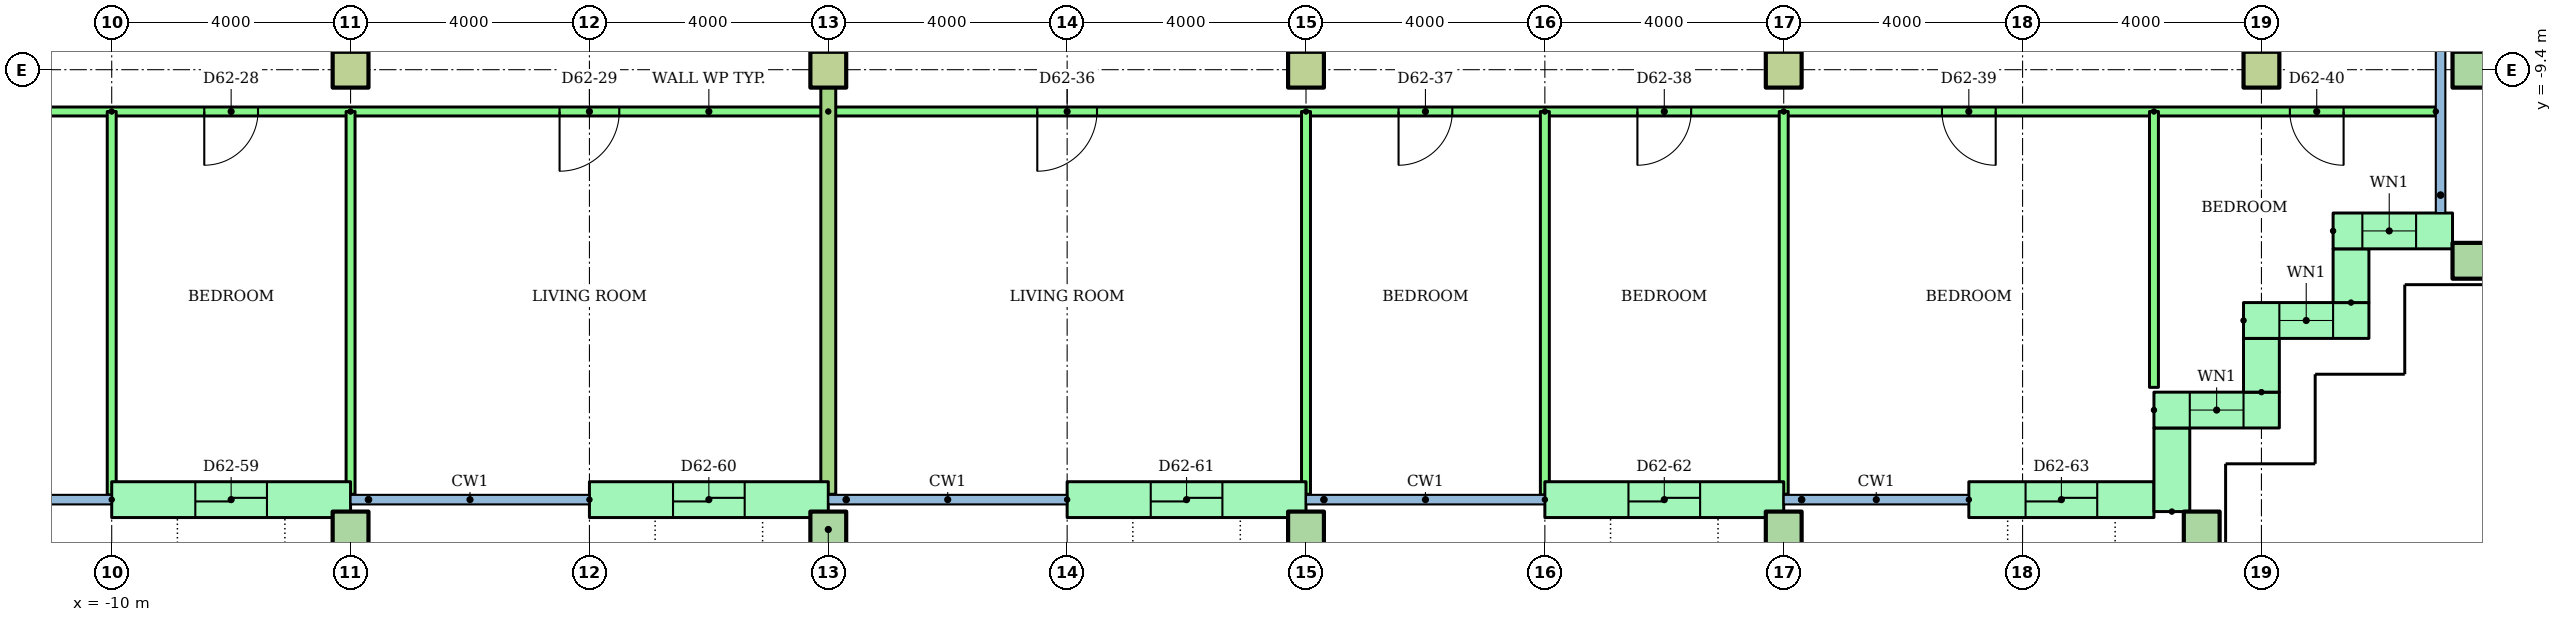
"""IFC4 building model, lengths in metres.
Left out: names, types, materials, properties, quantities, classifications, styles, units other than length and angle.
Written with IfcOpenShell. Run it as: python <this file> out.ifc"""

import sys

from ifc_helpers import new_model, si_unit, direction, frame, frame_2d, origin, origin_2d, place, context, subcontext, project, spatial, rectangle, hollow_rectangle, extrude, element, fill, save


model = new_model("IFC4")
c1 = context("Model", 3, precision=1e-05, world=origin(), true_north=direction((0.0, 1.0)))
c2 = subcontext(c1, "Body", "Model", "MODEL_VIEW")
j1 = project(units=[si_unit("LENGTHUNIT", "METRE"), si_unit("PLANEANGLEUNIT", "RADIAN")], contexts=[c1])
p1 = place(None, origin())
s1 = spatial("IfcSite", under=j1, at=p1, CompositionType="ELEMENT")
p2 = place(p1, origin())
s2 = spatial("IfcBuilding", under=s1, at=p2, CompositionType="ELEMENT")
p3 = place(p2, frame((0.0, 0.0, 236.4)))
s3 = spatial("IfcBuildingStorey", under=s2, at=p3, CompositionType="ELEMENT", Elevation=236.4)
for number, where in (
    (1, (-6.0, -17.1, 0.0)),
    (2, (2.0, -17.1, 0.0)),
    (3, (10.0, -17.1, 0.0)),
    (4, (18.0, -17.1, 0.0)),
    (5, (25.0, -17.1, 0.0)),
    (6, (29.5, -12.6, 0.0)),
):
    element("IfcColumn", number, at=place(p3, frame(where)), inside=s3, PredefinedType="COLUMN", context=c2, shape_type="SweptSolid", body=[
        extrude(hollow_rectangle(XDim=0.6, YDim=0.6, WallThickness=0.03, at=origin_2d()), origin(), (0.0, 0.0, 1.0), 3.2),
    ])
for number, where in (
    (7, (-6.0, -9.4, 0.0)),
    (8, (2.0, -9.4, 0.0)),
    (9, (10.0, -9.4, 0.0)),
    (10, (18.0, -9.4, 0.0)),
    (11, (26.0, -9.4, 0.0)),
):
    element("IfcColumn", number, at=place(p3, frame(where)), inside=s3, PredefinedType="COLUMN", context=c2, shape_type="SweptSolid", body=[
        extrude(rectangle(XDim=0.6, YDim=0.6, at=origin_2d()), origin(), (0.0, 0.0, 1.0), 3.2),
    ])
p4 = place(p3, frame((29.5, -9.4, 0.0)))
e12 = element("IfcColumn", 12, at=p4, inside=s3, PredefinedType="COLUMN", context=c2, shape_type="SweptSolid", body=[
    extrude(hollow_rectangle(XDim=0.6, YDim=0.6, WallThickness=0.03, at=origin_2d()), origin(), (0.0, 0.0, 1.0), 3.2),
])
p5 = place(p3, frame((-10.0, -16.6, 0.0)))
e13 = element("IfcWall", 13, at=p5, inside=s3, PredefinedType="STANDARD", context=c2, shape_type="SweptSolid", body=[
    extrude(rectangle(XDim=4.0, YDim=0.6, at=frame_2d((2.0, 0.0))), origin(), (0.0, 0.0, 1.0), 2.8),
])
p6 = place(p5, frame((1.4, 0.0, 0.0)))
e14 = element("IfcOpeningElement", 14, at=p6, cuts=e13, PredefinedType="OPENING", context=c2, shape_type="SweptSolid", body=[
    extrude(rectangle(XDim=1.2, YDim=2.1, at=frame_2d((0.6, 1.05))), frame((0.0, 0.31, 0.0), z_axis=(0.0, -1.0, 0.0), x_axis=(1.0, 0.0, 0.0)), (0.0, 0.0, 1.0), 0.62),
])
p7 = place(p3, frame((-2.0, -16.6, 0.0)))
e15 = element("IfcWall", 15, at=p7, inside=s3, PredefinedType="STANDARD", context=c2, shape_type="SweptSolid", body=[
    extrude(rectangle(XDim=4.0, YDim=0.6, at=frame_2d((2.0, 0.0))), origin(), (0.0, 0.0, 1.0), 2.8),
])
p8 = place(p7, frame((1.4, 0.0, 0.0)))
e16 = element("IfcOpeningElement", 16, at=p8, cuts=e15, PredefinedType="OPENING", context=c2, shape_type="SweptSolid", body=[
    extrude(rectangle(XDim=1.2, YDim=2.1, at=frame_2d((0.6, 1.05))), frame((0.0, 0.31, 0.0), z_axis=(0.0, -1.0, 0.0), x_axis=(1.0, 0.0, 0.0)), (0.0, 0.0, 1.0), 0.62),
])
p9 = place(p3, frame((6.0, -16.6, 0.0)))
e17 = element("IfcWall", 17, at=p9, inside=s3, PredefinedType="STANDARD", context=c2, shape_type="SweptSolid", body=[
    extrude(rectangle(XDim=4.0, YDim=0.6, at=frame_2d((2.0, 0.0))), origin(), (0.0, 0.0, 1.0), 2.8),
])
p10 = place(p9, frame((1.4, 0.0, 0.0)))
e18 = element("IfcOpeningElement", 18, at=p10, cuts=e17, PredefinedType="OPENING", context=c2, shape_type="SweptSolid", body=[
    extrude(rectangle(XDim=1.2, YDim=2.1, at=frame_2d((0.6, 1.05))), frame((0.0, 0.31, 0.0), z_axis=(0.0, -1.0, 0.0), x_axis=(1.0, 0.0, 0.0)), (0.0, 0.0, 1.0), 0.62),
])
p11 = place(p3, frame((14.0, -16.6, 0.0)))
e19 = element("IfcWall", 19, at=p11, inside=s3, PredefinedType="STANDARD", context=c2, shape_type="SweptSolid", body=[
    extrude(rectangle(XDim=4.0, YDim=0.6, at=frame_2d((2.0, 0.0))), origin(), (0.0, 0.0, 1.0), 2.8),
])
p12 = place(p11, frame((1.4, 0.0, 0.0)))
e20 = element("IfcOpeningElement", 20, at=p12, cuts=e19, PredefinedType="OPENING", context=c2, shape_type="SweptSolid", body=[
    extrude(rectangle(XDim=1.2, YDim=2.1, at=frame_2d((0.6, 1.05))), frame((0.0, 0.31, 0.0), z_axis=(0.0, -1.0, 0.0), x_axis=(1.0, 0.0, 0.0)), (0.0, 0.0, 1.0), 0.62),
])
p13 = place(p3, frame((21.1, -16.6, 0.0)))
e21 = element("IfcWall", 21, at=p13, inside=s3, PredefinedType="STANDARD", context=c2, shape_type="SweptSolid", body=[
    extrude(rectangle(XDim=3.1, YDim=0.6, at=frame_2d((1.55, 0.0))), origin(), (0.0, 0.0, 1.0), 2.8),
])
p14 = place(p13, frame((0.95, 0.0, 0.0)))
e22 = element("IfcOpeningElement", 22, at=p14, cuts=e21, PredefinedType="OPENING", context=c2, shape_type="SweptSolid", body=[
    extrude(rectangle(XDim=1.2, YDim=2.1, at=frame_2d((0.6, 1.05))), frame((0.0, 0.31, 0.0), z_axis=(0.0, -1.0, 0.0), x_axis=(1.0, 0.0, 0.0)), (0.0, 0.0, 1.0), 0.62),
])
p15 = place(p3, frame((24.5, -16.8, 0.0), z_axis=(0.0, 0.0, 1.0), x_axis=(0.0, 1.0, 0.0)))
e23 = element("IfcWall", 23, at=p15, inside=s3, PredefinedType="STANDARD", context=c2, shape_type="SweptSolid", body=[
    extrude(rectangle(XDim=1.4, YDim=0.6, at=frame_2d((0.7, 0.0))), origin(), (0.0, 0.0, 1.0), 2.8),
])
p16 = place(p3, frame((24.2, -15.1, 0.0)))
e24 = element("IfcWall", 24, at=p16, inside=s3, PredefinedType="STANDARD", context=c2, shape_type="SweptSolid", body=[
    extrude(rectangle(XDim=2.1, YDim=0.6, at=frame_2d((1.05, 0.0))), origin(), (0.0, 0.0, 1.0), 2.8),
])
p17 = place(p16, frame((0.6, 0.0, 0.9)))
e25 = element("IfcOpeningElement", 25, at=p17, cuts=e24, PredefinedType="OPENING", context=c2, shape_type="SweptSolid", body=[
    extrude(rectangle(XDim=0.9, YDim=1.5, at=frame_2d((0.45, 0.75))), frame((0.0, 0.31, 0.0), z_axis=(0.0, -1.0, 0.0), x_axis=(1.0, 0.0, 0.0)), (0.0, 0.0, 1.0), 0.62),
])
p18 = place(p3, frame((26.0, -14.8, 0.0), z_axis=(0.0, 0.0, 1.0), x_axis=(0.0, 1.0, 0.0)))
e26 = element("IfcWall", 26, at=p18, inside=s3, PredefinedType="STANDARD", context=c2, shape_type="SweptSolid", body=[
    extrude(rectangle(XDim=0.9, YDim=0.6, at=frame_2d((0.45, 0.0))), origin(), (0.0, 0.0, 1.0), 2.8),
])
p19 = place(p3, frame((25.7, -13.6, 0.0)))
e27 = element("IfcWall", 27, at=p19, inside=s3, PredefinedType="STANDARD", context=c2, shape_type="SweptSolid", body=[
    extrude(rectangle(XDim=2.1, YDim=0.6, at=frame_2d((1.05, 0.0))), origin(), (0.0, 0.0, 1.0), 2.8),
])
p20 = place(p19, frame((0.6, 0.0, 0.9)))
e28 = element("IfcOpeningElement", 28, at=p20, cuts=e27, PredefinedType="OPENING", context=c2, shape_type="SweptSolid", body=[
    extrude(rectangle(XDim=0.9, YDim=1.5, at=frame_2d((0.45, 0.75))), frame((0.0, 0.31, 0.0), z_axis=(0.0, -1.0, 0.0), x_axis=(1.0, 0.0, 0.0)), (0.0, 0.0, 1.0), 0.62),
])
p21 = place(p3, frame((27.5, -13.3, 0.0), z_axis=(0.0, 0.0, 1.0), x_axis=(0.0, 1.0, 0.0)))
e29 = element("IfcWall", 29, at=p21, inside=s3, PredefinedType="STANDARD", context=c2, shape_type="SweptSolid", body=[
    extrude(rectangle(XDim=0.9, YDim=0.6, at=frame_2d((0.45, 0.0))), origin(), (0.0, 0.0, 1.0), 2.8),
])
p22 = place(p3, frame((27.2, -12.1, 0.0)))
e30 = element("IfcWall", 30, at=p22, inside=s3, PredefinedType="STANDARD", context=c2, shape_type="SweptSolid", body=[
    extrude(rectangle(XDim=2.0, YDim=0.6, at=frame_2d((1.0, 0.0))), origin(), (0.0, 0.0, 1.0), 2.8),
])
p23 = place(p22, frame((0.49, 0.0, 0.9)))
e31 = element("IfcOpeningElement", 31, at=p23, cuts=e30, PredefinedType="OPENING", context=c2, shape_type="SweptSolid", body=[
    extrude(rectangle(XDim=0.9, YDim=1.5, at=frame_2d((0.45, 0.75))), frame((0.0, 0.31, 0.0), z_axis=(0.0, -1.0, 0.0), x_axis=(1.0, 0.0, 0.0)), (0.0, 0.0, 1.0), 0.62),
])
p24 = place(p3, frame((2.0, -10.1, 0.0), z_axis=(0.0, 0.0, 1.0), x_axis=(-1.0, 0.0, 0.0)))
e32 = element("IfcWall", 32, at=p24, inside=s3, PredefinedType="PARTITIONING", context=c2, shape_type="SweptSolid", body=[
    extrude(rectangle(XDim=16.0, YDim=0.15, at=frame_2d((8.0, 0.0))), origin(), (0.0, 0.0, 1.0), 2.4),
])
p25 = place(p24, frame((13.55, 0.0, 0.0)))
e33 = element("IfcOpeningElement", 33, at=p25, cuts=e32, PredefinedType="OPENING", context=c2, shape_type="SweptSolid", body=[
    extrude(rectangle(XDim=0.9, YDim=2.1, at=frame_2d((0.45, 1.05))), frame((0.0, 0.085, 0.0), z_axis=(0.0, -1.0, 0.0), x_axis=(1.0, 0.0, 0.0)), (0.0, 0.0, 1.0), 0.17),
])
p26 = place(p24, frame((9.55, 0.0, 0.0)))
e34 = element("IfcOpeningElement", 34, at=p26, cuts=e32, PredefinedType="OPENING", context=c2, shape_type="SweptSolid", body=[
    extrude(rectangle(XDim=0.9, YDim=2.1, at=frame_2d((0.45, 1.05))), frame((0.0, 0.085, 0.0), z_axis=(0.0, -1.0, 0.0), x_axis=(1.0, 0.0, 0.0)), (0.0, 0.0, 1.0), 0.17),
])
p27 = place(p24, frame((3.5, 0.0, 0.0)))
e35 = element("IfcOpeningElement", 35, at=p27, cuts=e32, PredefinedType="OPENING", context=c2, shape_type="SweptSolid", body=[
    extrude(rectangle(XDim=1.0, YDim=2.1, at=frame_2d((0.5, 1.05))), frame((0.0, 0.085, 0.0), z_axis=(0.0, -1.0, 0.0), x_axis=(1.0, 0.0, 0.0)), (0.0, 0.0, 1.0), 0.17),
])
p28 = place(p3, frame((-10.0, -10.1, 0.0), z_axis=(0.0, 0.0, 1.0), x_axis=(0.0, -1.0, 0.0)))
e36 = element("IfcWall", 36, at=p28, inside=s3, PredefinedType="PARTITIONING", context=c2, shape_type="SweptSolid", body=[
    extrude(rectangle(XDim=6.421, YDim=0.15, at=frame_2d((3.21, 0.0))), origin(), (0.0, 0.0, 1.0), 2.4),
])
p29 = place(p3, frame((-6.0, -10.1, 0.0), z_axis=(0.0, 0.0, 1.0), x_axis=(0.0, -1.0, 0.0)))
e37 = element("IfcWall", 37, at=p29, inside=s3, PredefinedType="PARTITIONING", context=c2, shape_type="SweptSolid", body=[
    extrude(rectangle(XDim=6.41, YDim=0.15, at=frame_2d((3.205, 0.0))), origin(), (0.0, 0.0, 1.0), 2.4),
])
p30 = place(p3, frame((28.92, -10.1, 0.0), z_axis=(0.0, 0.0, 1.0), x_axis=(-1.0, 0.0, 0.0)))
e38 = element("IfcWall", 38, at=p30, inside=s3, PredefinedType="PARTITIONING", context=c2, shape_type="SweptSolid", body=[
    extrude(rectangle(XDim=26.92, YDim=0.15, at=frame_2d((13.46, 0.0))), origin(), (0.0, 0.0, 1.0), 2.4),
])
p31 = place(p30, frame((22.42, 0.0, 0.0)))
e39 = element("IfcOpeningElement", 39, at=p31, cuts=e38, PredefinedType="OPENING", context=c2, shape_type="SweptSolid", body=[
    extrude(rectangle(XDim=1.0, YDim=2.1, at=frame_2d((0.5, 1.05))), frame((0.0, 0.085, 0.0), z_axis=(0.0, -1.0, 0.0), x_axis=(1.0, 0.0, 0.0)), (0.0, 0.0, 1.0), 0.17),
])
p32 = place(p30, frame((16.47, 0.0, 0.0)))
e40 = element("IfcOpeningElement", 40, at=p32, cuts=e38, PredefinedType="OPENING", context=c2, shape_type="SweptSolid", body=[
    extrude(rectangle(XDim=0.9, YDim=2.1, at=frame_2d((0.45, 1.05))), frame((0.0, 0.085, 0.0), z_axis=(0.0, -1.0, 0.0), x_axis=(1.0, 0.0, 0.0)), (0.0, 0.0, 1.0), 0.17),
])
p33 = place(p30, frame((12.47, 0.0, 0.0)))
e41 = element("IfcOpeningElement", 41, at=p33, cuts=e38, PredefinedType="OPENING", context=c2, shape_type="SweptSolid", body=[
    extrude(rectangle(XDim=0.9, YDim=2.1, at=frame_2d((0.45, 1.05))), frame((0.0, 0.085, 0.0), z_axis=(0.0, -1.0, 0.0), x_axis=(1.0, 0.0, 0.0)), (0.0, 0.0, 1.0), 0.17),
])
p34 = place(p30, frame((7.37, 0.0, 0.0)))
e42 = element("IfcOpeningElement", 42, at=p34, cuts=e38, PredefinedType="OPENING", context=c2, shape_type="SweptSolid", body=[
    extrude(rectangle(XDim=0.9, YDim=2.1, at=frame_2d((0.45, 1.05))), frame((0.0, 0.085, 0.0), z_axis=(0.0, -1.0, 0.0), x_axis=(1.0, 0.0, 0.0)), (0.0, 0.0, 1.0), 0.17),
])
p35 = place(p30, frame((1.544, 0.0, 0.0)))
e43 = element("IfcOpeningElement", 43, at=p35, cuts=e38, PredefinedType="OPENING", context=c2, shape_type="SweptSolid", body=[
    extrude(rectangle(XDim=0.9, YDim=2.1, at=frame_2d((0.45, 1.05))), frame((0.0, 0.085, 0.0), z_axis=(0.0, -1.0, 0.0), x_axis=(1.0, 0.0, 0.0)), (0.0, 0.0, 1.0), 0.17),
])
p36 = place(p3, frame((10.0, -10.1, 0.0), z_axis=(0.0, 0.0, 1.0), x_axis=(0.0, -1.0, 0.0)))
e44 = element("IfcWall", 44, at=p36, inside=s3, PredefinedType="PARTITIONING", context=c2, shape_type="SweptSolid", body=[
    extrude(rectangle(XDim=6.41, YDim=0.15, at=frame_2d((3.205, 0.0))), origin(), (0.0, 0.0, 1.0), 2.4),
])
p37 = place(p3, frame((14.0, -10.1, 0.0), z_axis=(0.0, 0.0, 1.0), x_axis=(0.0, -1.0, 0.0)))
e45 = element("IfcWall", 45, at=p37, inside=s3, PredefinedType="PARTITIONING", context=c2, shape_type="SweptSolid", body=[
    extrude(rectangle(XDim=6.421, YDim=0.15, at=frame_2d((3.21, 0.0))), origin(), (0.0, 0.0, 1.0), 2.4),
])
p38 = place(p3, frame((18.0, -10.1, 0.0), z_axis=(0.0, 0.0, 1.0), x_axis=(0.0, -1.0, 0.0)))
e46 = element("IfcWall", 46, at=p38, inside=s3, PredefinedType="PARTITIONING", context=c2, shape_type="SweptSolid", body=[
    extrude(rectangle(XDim=6.41, YDim=0.15, at=frame_2d((3.205, 0.0))), origin(), (0.0, 0.0, 1.0), 2.4),
])
p39 = place(p3, frame((24.2, -10.1, 0.0), z_axis=(0.0, 0.0, 1.0), x_axis=(0.0, -1.0, 0.0)))
e47 = element("IfcWall", 47, at=p39, inside=s3, PredefinedType="PARTITIONING", context=c2, shape_type="SweptSolid", body=[
    extrude(rectangle(XDim=4.62, YDim=0.15, at=frame_2d((2.31, 0.0))), origin(), (0.0, 0.0, 1.0), 2.4),
])
p40 = place(p3, frame((2.0, -1.4, 0.0), z_axis=(0.0, 0.0, 1.0), x_axis=(0.0, -1.0, 0.0)))
e48 = element("IfcWall", 48, at=p40, inside=s3, PredefinedType="PARTITIONING", context=c2, shape_type="SweptSolid", body=[
    extrude(rectangle(XDim=15.11, YDim=0.25, at=frame_2d((7.555, 0.0))), origin(), (0.0, 0.0, 1.0), 2.4),
])
p41 = place(p17, origin())
e49 = element("IfcWindow", 49, at=p41, inside=s3, PartitioningType="SINGLE_PANEL", PredefinedType="WINDOW", context=c2, shape_type="SweptSolid", body=[
    extrude(rectangle(XDim=0.9, YDim=1.5, at=frame_2d((0.45, 0.75))), frame((0.0, 0.03, 0.0), z_axis=(0.0, -1.0, 0.0), x_axis=(1.0, 0.0, 0.0)), (0.0, 0.0, 1.0), 0.06),
])
fill(e25, e49)
p42 = place(p20, origin())
e50 = element("IfcWindow", 50, at=p42, inside=s3, PartitioningType="SINGLE_PANEL", PredefinedType="WINDOW", context=c2, shape_type="SweptSolid", body=[
    extrude(rectangle(XDim=0.9, YDim=1.5, at=frame_2d((0.45, 0.75))), frame((0.0, 0.03, 0.0), z_axis=(0.0, -1.0, 0.0), x_axis=(1.0, 0.0, 0.0)), (0.0, 0.0, 1.0), 0.06),
])
fill(e28, e50)
p43 = place(p23, origin())
e51 = element("IfcWindow", 51, at=p43, inside=s3, PartitioningType="SINGLE_PANEL", PredefinedType="WINDOW", context=c2, shape_type="SweptSolid", body=[
    extrude(rectangle(XDim=0.9, YDim=1.5, at=frame_2d((0.45, 0.75))), frame((0.0, 0.03, 0.0), z_axis=(0.0, -1.0, 0.0), x_axis=(1.0, 0.0, 0.0)), (0.0, 0.0, 1.0), 0.06),
])
fill(e31, e51)
p44 = place(p26, origin())
e52 = element("IfcDoor", 52, at=p44, inside=s3, OperationType="SINGLE_SWING_RIGHT", PredefinedType="DOOR", context=c2, shape_type="SweptSolid", body=[
    extrude(rectangle(XDim=0.9, YDim=2.1, at=frame_2d((0.45, 1.05))), frame((0.0, 0.025, 0.0), z_axis=(0.0, -1.0, 0.0), x_axis=(1.0, 0.0, 0.0)), (0.0, 0.0, 1.0), 0.05),
])
fill(e34, e52)
p45 = place(p27, origin())
e53 = element("IfcDoor", 53, at=p45, inside=s3, OperationType="SINGLE_SWING_RIGHT", PredefinedType="DOOR", context=c2, shape_type="SweptSolid", body=[
    extrude(rectangle(XDim=1.0, YDim=2.1, at=frame_2d((0.5, 1.05))), frame((0.0, 0.025, 0.0), z_axis=(0.0, -1.0, 0.0), x_axis=(1.0, 0.0, 0.0)), (0.0, 0.0, 1.0), 0.05),
])
fill(e35, e53)
p46 = place(p31, origin())
e54 = element("IfcDoor", 54, at=p46, inside=s3, OperationType="SINGLE_SWING_RIGHT", PredefinedType="DOOR", context=c2, shape_type="SweptSolid", body=[
    extrude(rectangle(XDim=1.0, YDim=2.1, at=frame_2d((0.5, 1.05))), frame((0.0, 0.025, 0.0), z_axis=(0.0, -1.0, 0.0), x_axis=(1.0, 0.0, 0.0)), (0.0, 0.0, 1.0), 0.05),
])
fill(e39, e54)
p47 = place(p32, origin())
e55 = element("IfcDoor", 55, at=p47, inside=s3, OperationType="SINGLE_SWING_RIGHT", PredefinedType="DOOR", context=c2, shape_type="SweptSolid", body=[
    extrude(rectangle(XDim=0.9, YDim=2.1, at=frame_2d((0.45, 1.05))), frame((0.0, 0.025, 0.0), z_axis=(0.0, -1.0, 0.0), x_axis=(1.0, 0.0, 0.0)), (0.0, 0.0, 1.0), 0.05),
])
fill(e40, e55)
p48 = place(p33, origin())
e56 = element("IfcDoor", 56, at=p48, inside=s3, OperationType="SINGLE_SWING_RIGHT", PredefinedType="DOOR", context=c2, shape_type="SweptSolid", body=[
    extrude(rectangle(XDim=0.9, YDim=2.1, at=frame_2d((0.45, 1.05))), frame((0.0, 0.025, 0.0), z_axis=(0.0, -1.0, 0.0), x_axis=(1.0, 0.0, 0.0)), (0.0, 0.0, 1.0), 0.05),
])
fill(e41, e56)
p49 = place(p34, origin())
e57 = element("IfcDoor", 57, at=p49, inside=s3, OperationType="SINGLE_SWING_LEFT", PredefinedType="DOOR", context=c2, shape_type="SweptSolid", body=[
    extrude(rectangle(XDim=0.9, YDim=2.1, at=frame_2d((0.45, 1.05))), frame((0.0, 0.025, 0.0), z_axis=(0.0, -1.0, 0.0), x_axis=(1.0, 0.0, 0.0)), (0.0, 0.0, 1.0), 0.05),
])
fill(e42, e57)
p50 = place(p35, origin())
e58 = element("IfcDoor", 58, at=p50, inside=s3, OperationType="SINGLE_SWING_LEFT", PredefinedType="DOOR", context=c2, shape_type="SweptSolid", body=[
    extrude(rectangle(XDim=0.9, YDim=2.1, at=frame_2d((0.45, 1.05))), frame((0.0, 0.025, 0.0), z_axis=(0.0, -1.0, 0.0), x_axis=(1.0, 0.0, 0.0)), (0.0, 0.0, 1.0), 0.05),
])
fill(e43, e58)
p51 = place(p6, origin())
e59 = element("IfcDoor", 59, at=p51, inside=s3, OperationType="SLIDING_TO_LEFT", PredefinedType="DOOR", context=c2, shape_type="SweptSolid", body=[
    extrude(rectangle(XDim=1.2, YDim=2.1, at=frame_2d((0.6, 1.05))), frame((0.0, 0.025, 0.0), z_axis=(0.0, -1.0, 0.0), x_axis=(1.0, 0.0, 0.0)), (0.0, 0.0, 1.0), 0.05),
])
fill(e14, e59)
p52 = place(p8, origin())
e60 = element("IfcDoor", 60, at=p52, inside=s3, OperationType="SLIDING_TO_LEFT", PredefinedType="DOOR", context=c2, shape_type="SweptSolid", body=[
    extrude(rectangle(XDim=1.2, YDim=2.1, at=frame_2d((0.6, 1.05))), frame((0.0, 0.025, 0.0), z_axis=(0.0, -1.0, 0.0), x_axis=(1.0, 0.0, 0.0)), (0.0, 0.0, 1.0), 0.05),
])
fill(e16, e60)
p53 = place(p10, origin())
e61 = element("IfcDoor", 61, at=p53, inside=s3, OperationType="SLIDING_TO_LEFT", PredefinedType="DOOR", context=c2, shape_type="SweptSolid", body=[
    extrude(rectangle(XDim=1.2, YDim=2.1, at=frame_2d((0.6, 1.05))), frame((0.0, 0.025, 0.0), z_axis=(0.0, -1.0, 0.0), x_axis=(1.0, 0.0, 0.0)), (0.0, 0.0, 1.0), 0.05),
])
fill(e18, e61)
p54 = place(p12, origin())
e62 = element("IfcDoor", 62, at=p54, inside=s3, OperationType="SLIDING_TO_LEFT", PredefinedType="DOOR", context=c2, shape_type="SweptSolid", body=[
    extrude(rectangle(XDim=1.2, YDim=2.1, at=frame_2d((0.6, 1.05))), frame((0.0, 0.025, 0.0), z_axis=(0.0, -1.0, 0.0), x_axis=(1.0, 0.0, 0.0)), (0.0, 0.0, 1.0), 0.05),
])
fill(e20, e62)
p55 = place(p14, origin())
e63 = element("IfcDoor", 63, at=p55, inside=s3, OperationType="SLIDING_TO_LEFT", PredefinedType="DOOR", context=c2, shape_type="SweptSolid", body=[
    extrude(rectangle(XDim=1.2, YDim=2.1, at=frame_2d((0.6, 1.05))), frame((0.0, 0.025, 0.0), z_axis=(0.0, -1.0, 0.0), x_axis=(1.0, 0.0, 0.0)), (0.0, 0.0, 1.0), 0.05),
])
fill(e22, e63)
save(model, sys.argv[1])
